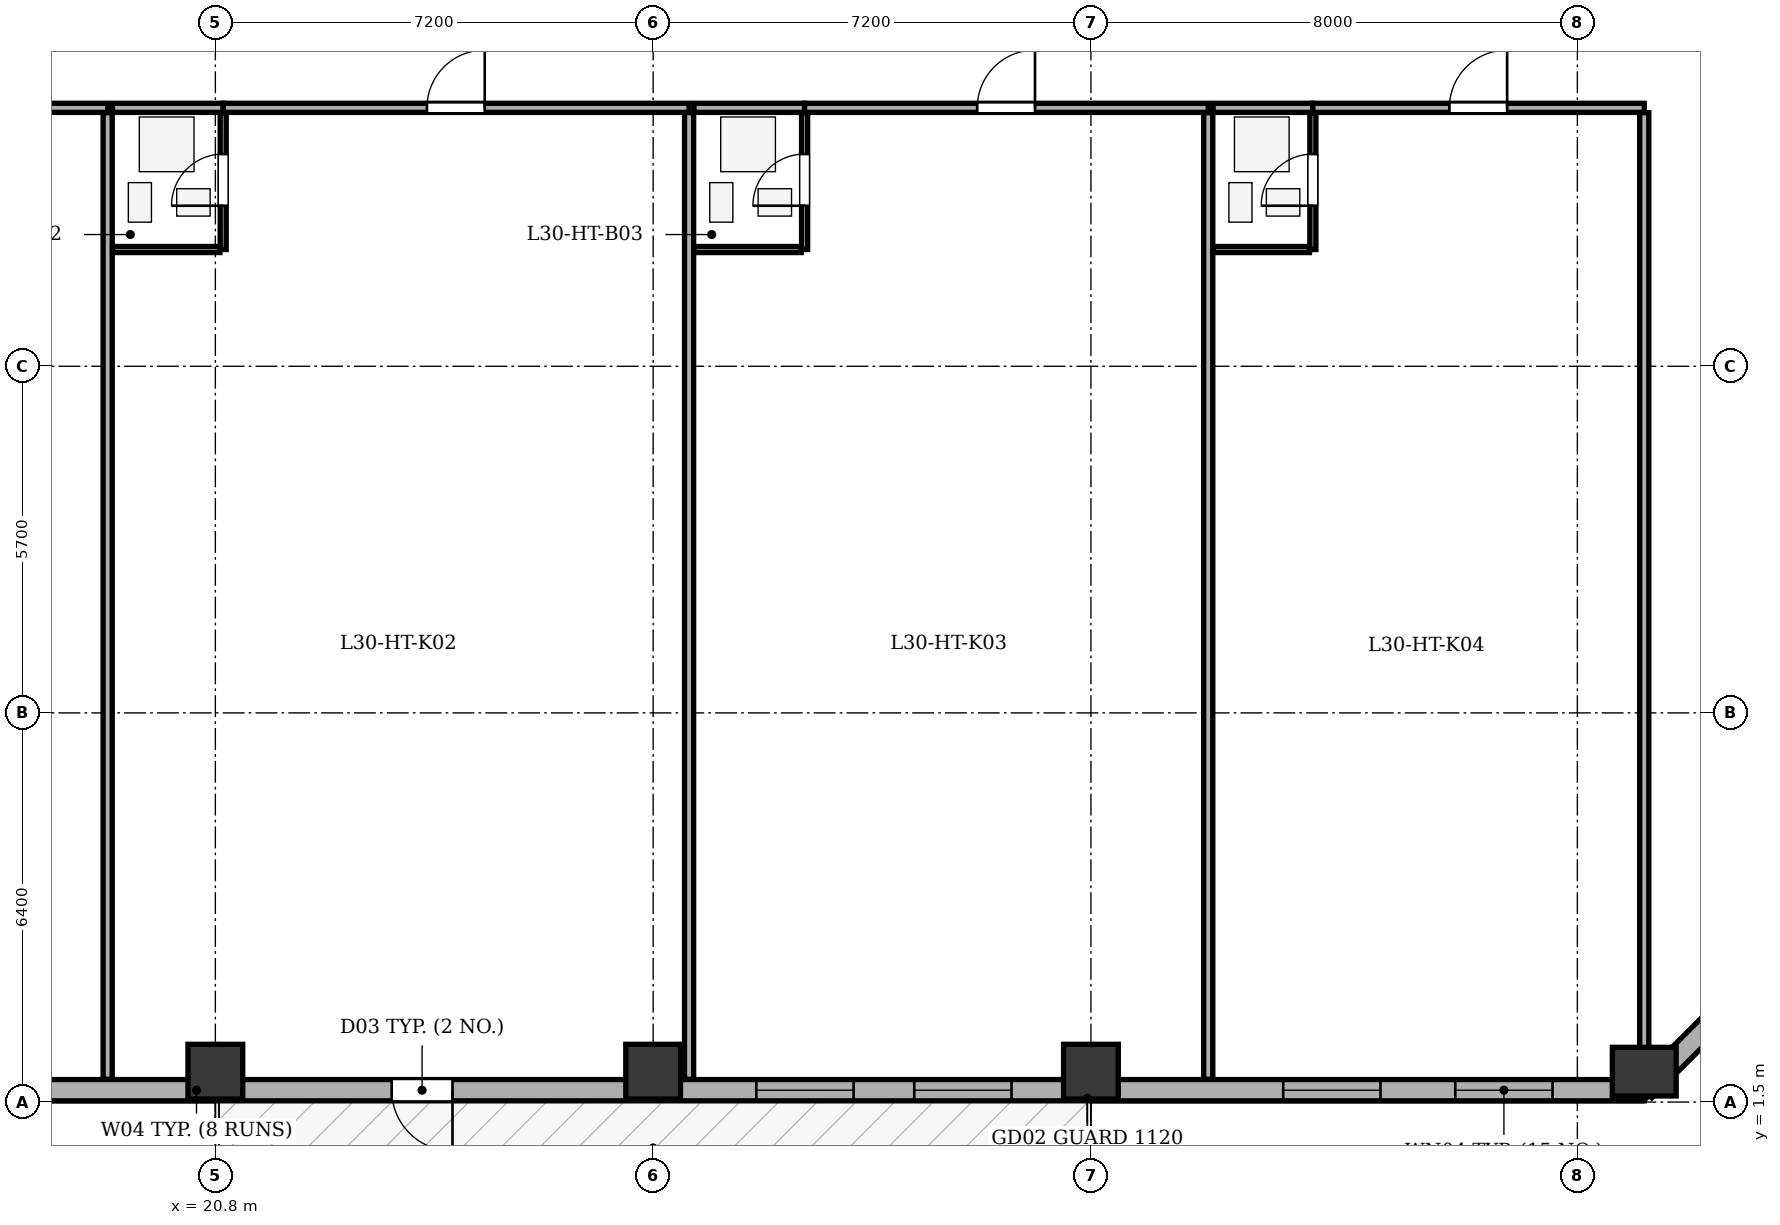
"""IFC4 building model, lengths in metres.
Left out: names, types, materials, properties, quantities, classifications, styles, units other than length and angle.
Written with IfcOpenShell. Run it as: python <this file> out.ifc"""

import sys

from ifc_helpers import new_model, si_unit, direction, frame, frame_2d, origin, origin_2d, place, context, subcontext, project, spatial, rectangle, extrude, element, fill, save


model = new_model("IFC4")
c1 = context("Model", 3, precision=1e-05, world=origin(), true_north=direction((0.0, 1.0)))
c2 = subcontext(c1, "Body", "Model", "MODEL_VIEW")
j1 = project(units=[si_unit("LENGTHUNIT", "METRE"), si_unit("PLANEANGLEUNIT", "RADIAN")], contexts=[c1])
p1 = place(None, origin())
s1 = spatial("IfcSite", under=j1, at=p1, CompositionType="ELEMENT")
p2 = place(p1, origin())
s2 = spatial("IfcBuilding", under=s1, at=p2, CompositionType="ELEMENT")
p3 = place(p2, frame((0.0, 0.0, 123.8)))
s3 = spatial("IfcBuildingStorey", under=s2, at=p3, CompositionType="ELEMENT", Elevation=123.8)
for number, where, z_axis, x_axis in (
    (1, (20.8, 2.0, 0.0), (0.0, 0.0, 1.0), (1.0, 0.0, 0.0)),
    (2, (28.0, 2.0, 0.0), (0.0, 0.0, 1.0), (1.0, 0.0, 0.0)),
    (3, (35.2, 2.0, 0.0), (0.0, 0.0, 1.0), (1.0, 0.0, 0.0)),
):
    element("IfcColumn", number, at=place(p3, frame(where, z_axis=z_axis, x_axis=x_axis)), inside=s3, PredefinedType="COLUMN", context=c2, shape_type="SweptSolid", body=[
        extrude(rectangle(XDim=0.9, YDim=0.9, at=origin_2d()), origin(), (0.0, 0.0, 1.0), 3.5),
    ])
p4 = place(p3, frame((44.3, 2.0, 0.0), z_axis=(0.0, 0.0, 1.0), x_axis=(1.0, 0.0, 0.0)))
e4 = element("IfcColumn", 4, at=p4, inside=s3, PredefinedType="COLUMN", context=c2, shape_type="SweptSolid", body=[
    extrude(rectangle(XDim=0.8, YDim=1.05, at=origin_2d()), origin(), (0.0, 0.0, 1.0), 3.5),
])
p5 = place(p3, frame((44.3, 1.695, 0.0), z_axis=(0.0, 0.0, 1.0), x_axis=(-1.0, 0.0, 0.0)))
e5 = element("IfcWall", 5, at=p5, inside=s3, PredefinedType="STANDARD", context=c2, shape_type="SweptSolid", body=[
    extrude(rectangle(XDim=35.0, YDim=0.35, at=frame_2d((17.5, 0.0))), origin(), (0.0, 0.0, 1.0), 2.785),
])
p6 = place(p5, frame((19.6, 0.0, 0.0)))
e6 = element("IfcOpeningElement", 6, at=p6, cuts=e5, PredefinedType="OPENING", context=c2, shape_type="SweptSolid", body=[
    extrude(rectangle(XDim=1.0, YDim=2.02, at=frame_2d((0.5, 1.01))), frame((0.0, 0.185, 0.0), z_axis=(0.0, -1.0, 0.0), x_axis=(1.0, 0.0, 0.0)), (0.0, 0.0, 1.0), 0.37),
])
p7 = place(p5, frame((1.508, 0.0, 0.75)))
e7 = element("IfcOpeningElement", 7, at=p7, cuts=e5, PredefinedType="OPENING", context=c2, shape_type="SweptSolid", body=[
    extrude(rectangle(XDim=1.6, YDim=1.75, at=frame_2d((0.8, 0.875))), frame((0.0, 0.185, 0.0), z_axis=(0.0, -1.0, 0.0), x_axis=(1.0, 0.0, 0.0)), (0.0, 0.0, 1.0), 0.37),
])
p8 = place(p5, frame((4.338, 0.0, 0.75)))
e8 = element("IfcOpeningElement", 8, at=p8, cuts=e5, PredefinedType="OPENING", context=c2, shape_type="SweptSolid", body=[
    extrude(rectangle(XDim=1.6, YDim=1.75, at=frame_2d((0.8, 0.875))), frame((0.0, 0.185, 0.0), z_axis=(0.0, -1.0, 0.0), x_axis=(1.0, 0.0, 0.0)), (0.0, 0.0, 1.0), 0.37),
])
p9 = place(p5, frame((10.406, 0.0, 0.75)))
e9 = element("IfcOpeningElement", 9, at=p9, cuts=e5, PredefinedType="OPENING", context=c2, shape_type="SweptSolid", body=[
    extrude(rectangle(XDim=1.6, YDim=1.75, at=frame_2d((0.8, 0.875))), frame((0.0, 0.185, 0.0), z_axis=(0.0, -1.0, 0.0), x_axis=(1.0, 0.0, 0.0)), (0.0, 0.0, 1.0), 0.37),
])
p10 = place(p5, frame((13.003, 0.0, 0.75)))
e10 = element("IfcOpeningElement", 10, at=p10, cuts=e5, PredefinedType="OPENING", context=c2, shape_type="SweptSolid", body=[
    extrude(rectangle(XDim=1.6, YDim=1.75, at=frame_2d((0.8, 0.875))), frame((0.0, 0.185, 0.0), z_axis=(0.0, -1.0, 0.0), x_axis=(1.0, 0.0, 0.0)), (0.0, 0.0, 1.0), 0.37),
])
p11 = place(p5, frame((27.02, 0.0, 0.75)))
e11 = element("IfcOpeningElement", 11, at=p11, cuts=e5, PredefinedType="OPENING", context=c2, shape_type="SweptSolid", body=[
    extrude(rectangle(XDim=1.6, YDim=1.75, at=frame_2d((0.8, 0.875))), frame((0.0, 0.185, 0.0), z_axis=(0.0, -1.0, 0.0), x_axis=(1.0, 0.0, 0.0)), (0.0, 0.0, 1.0), 0.37),
])
p12 = place(p5, frame((30.551, 0.0, 0.75)))
e12 = element("IfcOpeningElement", 12, at=p12, cuts=e5, PredefinedType="OPENING", context=c2, shape_type="SweptSolid", body=[
    extrude(rectangle(XDim=2.1, YDim=1.75, at=frame_2d((1.05, 0.875))), frame((0.0, 0.185, 0.0), z_axis=(0.0, -1.0, 0.0), x_axis=(1.0, 0.0, 0.0)), (0.0, 0.0, 1.0), 0.37),
])
p13 = place(p3, frame((49.105, 6.5, 0.0), z_axis=(0.0, 0.0, 1.0), x_axis=(-0.707106781187, -0.707106781187, 0.0)))
e13 = element("IfcWall", 13, at=p13, inside=s3, PredefinedType="STANDARD", context=c2, shape_type="SweptSolid", body=[
    extrude(rectangle(XDim=6.795, YDim=0.35, at=frame_2d((3.397, 0.0))), origin(), (0.0, 0.0, 1.0), 2.785),
])
p14 = place(p13, frame((2.698, 0.0, 0.75)))
e14 = element("IfcOpeningElement", 14, at=p14, cuts=e13, PredefinedType="OPENING", context=c2, shape_type="SweptSolid", body=[
    extrude(rectangle(XDim=1.4, YDim=1.65, at=frame_2d((0.7, 0.825))), frame((0.0, 0.185, 0.0), z_axis=(0.0, -1.0, 0.0), x_axis=(1.0, 0.0, 0.0)), (0.0, 0.0, 1.0), 0.37),
])
p15 = place(p3, frame((12.05, 17.85, 0.0), z_axis=(0.0, 0.0, 1.0), x_axis=(1.0, 0.0, 0.0)))
e15 = element("IfcWall", 15, at=p15, inside=s3, PredefinedType="PARTITIONING", context=c2, shape_type="SweptSolid", body=[
    extrude(rectangle(XDim=6.979, YDim=0.15, at=frame_2d((3.49, 0.0))), origin(), (0.0, 0.0, 1.0), 3.2),
])
p16 = place(p15, frame((3.01, 0.0, 0.0)))
e16 = element("IfcOpeningElement", 16, at=p16, cuts=e15, PredefinedType="OPENING", context=c2, shape_type="SweptSolid", body=[
    extrude(rectangle(XDim=0.95, YDim=2.1, at=frame_2d((0.475, 1.05))), frame((0.0, 0.085, 0.0), z_axis=(0.0, -1.0, 0.0), x_axis=(1.0, 0.0, 0.0)), (0.0, 0.0, 1.0), 0.17),
])
p17 = place(p3, frame((19.029, 1.875, 0.0), z_axis=(0.0, 0.0, 1.0), x_axis=(0.0, 1.0, 0.0)))
e17 = element("IfcWall", 17, at=p17, inside=s3, PredefinedType="PARTITIONING", context=c2, shape_type="SweptSolid", body=[
    extrude(rectangle(XDim=15.895, YDim=0.15, at=frame_2d((7.948, 0.0))), origin(), (0.0, 0.0, 1.0), 3.2),
])
p18 = place(p3, frame((19.109, 17.85, 0.0), z_axis=(0.0, 0.0, 1.0), x_axis=(1.0, 0.0, 0.0)))
e18 = element("IfcWall", 18, at=p18, inside=s3, PredefinedType="PARTITIONING", context=c2, shape_type="SweptSolid", body=[
    extrude(rectangle(XDim=1.82, YDim=0.15, at=frame_2d((0.91, 0.0))), origin(), (0.0, 0.0, 1.0), 3.2),
])
p19 = place(p3, frame((20.929, 17.85, 0.0), z_axis=(0.0, 0.0, 1.0), x_axis=(1.0, 0.0, 0.0)))
e19 = element("IfcWall", 19, at=p19, inside=s3, PredefinedType="PARTITIONING", context=c2, shape_type="SweptSolid", body=[
    extrude(rectangle(XDim=7.662, YDim=0.15, at=frame_2d((3.831, 0.0))), origin(), (0.0, 0.0, 1.0), 3.2),
])
p20 = place(p19, frame((3.351, 0.0, 0.0)))
e20 = element("IfcOpeningElement", 20, at=p20, cuts=e19, PredefinedType="OPENING", context=c2, shape_type="SweptSolid", body=[
    extrude(rectangle(XDim=0.95, YDim=2.1, at=frame_2d((0.475, 1.05))), frame((0.0, 0.085, 0.0), z_axis=(0.0, -1.0, 0.0), x_axis=(1.0, 0.0, 0.0)), (0.0, 0.0, 1.0), 0.17),
])
p21 = place(p3, frame((20.929, 15.52, 0.0), z_axis=(0.0, 0.0, 1.0), x_axis=(0.0, 1.0, 0.0)))
e21 = element("IfcWall", 21, at=p21, inside=s3, PredefinedType="PARTITIONING", context=c2, shape_type="SweptSolid", body=[
    extrude(rectangle(XDim=2.25, YDim=0.1, at=frame_2d((1.125, 0.0))), origin(), (0.0, 0.0, 1.0), 2.535),
])
p22 = place(p21, frame((0.72, 0.0, 0.0)))
e22 = element("IfcOpeningElement", 22, at=p22, cuts=e21, PredefinedType="OPENING", context=c2, shape_type="SweptSolid", body=[
    extrude(rectangle(XDim=0.85, YDim=2.05, at=frame_2d((0.425, 1.025))), frame((0.0, 0.06, 0.0), z_axis=(0.0, -1.0, 0.0), x_axis=(1.0, 0.0, 0.0)), (0.0, 0.0, 1.0), 0.12),
])
p23 = place(p3, frame((19.109, 15.52, 0.0), z_axis=(0.0, 0.0, 1.0), x_axis=(1.0, 0.0, 0.0)))
e23 = element("IfcWall", 23, at=p23, inside=s3, PredefinedType="PARTITIONING", context=c2, shape_type="SweptSolid", body=[
    extrude(rectangle(XDim=1.765, YDim=0.1, at=frame_2d((0.883, 0.0))), origin(), (0.0, 0.0, 1.0), 3.2),
])
p24 = place(p3, frame((28.591, 1.875, 0.0), z_axis=(0.0, 0.0, 1.0), x_axis=(0.0, 1.0, 0.0)))
e24 = element("IfcWall", 24, at=p24, inside=s3, PredefinedType="PARTITIONING", context=c2, shape_type="SweptSolid", body=[
    extrude(rectangle(XDim=15.895, YDim=0.15, at=frame_2d((7.948, 0.0))), origin(), (0.0, 0.0, 1.0), 3.2),
])
p25 = place(p3, frame((28.671, 17.85, 0.0), z_axis=(0.0, 0.0, 1.0), x_axis=(1.0, 0.0, 0.0)))
e25 = element("IfcWall", 25, at=p25, inside=s3, PredefinedType="PARTITIONING", context=c2, shape_type="SweptSolid", body=[
    extrude(rectangle(XDim=1.82, YDim=0.15, at=frame_2d((0.91, 0.0))), origin(), (0.0, 0.0, 1.0), 3.2),
])
p26 = place(p3, frame((30.491, 17.85, 0.0), z_axis=(0.0, 0.0, 1.0), x_axis=(1.0, 0.0, 0.0)))
e26 = element("IfcWall", 26, at=p26, inside=s3, PredefinedType="PARTITIONING", context=c2, shape_type="SweptSolid", body=[
    extrude(rectangle(XDim=6.638, YDim=0.15, at=frame_2d((3.319, 0.0))), origin(), (0.0, 0.0, 1.0), 3.2),
])
p27 = place(p26, frame((2.839, 0.0, 0.0)))
e27 = element("IfcOpeningElement", 27, at=p27, cuts=e26, PredefinedType="OPENING", context=c2, shape_type="SweptSolid", body=[
    extrude(rectangle(XDim=0.95, YDim=2.1, at=frame_2d((0.475, 1.05))), frame((0.0, 0.085, 0.0), z_axis=(0.0, -1.0, 0.0), x_axis=(1.0, 0.0, 0.0)), (0.0, 0.0, 1.0), 0.17),
])
p28 = place(p3, frame((30.491, 15.52, 0.0), z_axis=(0.0, 0.0, 1.0), x_axis=(0.0, 1.0, 0.0)))
e28 = element("IfcWall", 28, at=p28, inside=s3, PredefinedType="PARTITIONING", context=c2, shape_type="SweptSolid", body=[
    extrude(rectangle(XDim=2.25, YDim=0.1, at=frame_2d((1.125, 0.0))), origin(), (0.0, 0.0, 1.0), 3.2),
])
p29 = place(p28, frame((0.72, 0.0, 0.0)))
e29 = element("IfcOpeningElement", 29, at=p29, cuts=e28, PredefinedType="OPENING", context=c2, shape_type="SweptSolid", body=[
    extrude(rectangle(XDim=0.85, YDim=2.05, at=frame_2d((0.425, 1.025))), frame((0.0, 0.06, 0.0), z_axis=(0.0, -1.0, 0.0), x_axis=(1.0, 0.0, 0.0)), (0.0, 0.0, 1.0), 0.12),
])
p30 = place(p3, frame((28.671, 15.52, 0.0), z_axis=(0.0, 0.0, 1.0), x_axis=(1.0, 0.0, 0.0)))
e30 = element("IfcWall", 30, at=p30, inside=s3, PredefinedType="PARTITIONING", context=c2, shape_type="SweptSolid", body=[
    extrude(rectangle(XDim=1.765, YDim=0.1, at=frame_2d((0.883, 0.0))), origin(), (0.0, 0.0, 1.0), 3.2),
])
p31 = place(p3, frame((37.129, 1.875, 0.0), z_axis=(0.0, 0.0, 1.0), x_axis=(0.0, 1.0, 0.0)))
e31 = element("IfcWall", 31, at=p31, inside=s3, PredefinedType="PARTITIONING", context=c2, shape_type="SweptSolid", body=[
    extrude(rectangle(XDim=15.895, YDim=0.15, at=frame_2d((7.948, 0.0))), origin(), (0.0, 0.0, 1.0), 3.2),
])
p32 = place(p3, frame((37.209, 17.85, 0.0), z_axis=(0.0, 0.0, 1.0), x_axis=(1.0, 0.0, 0.0)))
e32 = element("IfcWall", 32, at=p32, inside=s3, PredefinedType="PARTITIONING", context=c2, shape_type="SweptSolid", body=[
    extrude(rectangle(XDim=1.641, YDim=0.15, at=frame_2d((0.821, 0.0))), origin(), (0.0, 0.0, 1.0), 3.2),
])
p33 = place(p3, frame((38.85, 17.85, 0.0), z_axis=(0.0, 0.0, 1.0), x_axis=(1.0, 0.0, 0.0)))
e33 = element("IfcWall", 33, at=p33, inside=s3, PredefinedType="PARTITIONING", context=c2, shape_type="SweptSolid", body=[
    extrude(rectangle(XDim=5.45, YDim=0.15, at=frame_2d((2.725, 0.0))), origin(), (0.0, 0.0, 1.0), 3.2),
])
p34 = place(p33, frame((2.245, 0.0, 0.0)))
e34 = element("IfcOpeningElement", 34, at=p34, cuts=e33, PredefinedType="OPENING", context=c2, shape_type="SweptSolid", body=[
    extrude(rectangle(XDim=0.95, YDim=2.1, at=frame_2d((0.475, 1.05))), frame((0.0, 0.085, 0.0), z_axis=(0.0, -1.0, 0.0), x_axis=(1.0, 0.0, 0.0)), (0.0, 0.0, 1.0), 0.17),
])
p35 = place(p3, frame((38.85, 15.52, 0.0), z_axis=(0.0, 0.0, 1.0), x_axis=(0.0, 1.0, 0.0)))
e35 = element("IfcWall", 35, at=p35, inside=s3, PredefinedType="PARTITIONING", context=c2, shape_type="SweptSolid", body=[
    extrude(rectangle(XDim=2.25, YDim=0.1, at=frame_2d((1.125, 0.0))), origin(), (0.0, 0.0, 1.0), 3.2),
])
p36 = place(p35, frame((0.72, 0.0, 0.0)))
e36 = element("IfcOpeningElement", 36, at=p36, cuts=e35, PredefinedType="OPENING", context=c2, shape_type="SweptSolid", body=[
    extrude(rectangle(XDim=0.85, YDim=2.05, at=frame_2d((0.425, 1.025))), frame((0.0, 0.06, 0.0), z_axis=(0.0, -1.0, 0.0), x_axis=(1.0, 0.0, 0.0)), (0.0, 0.0, 1.0), 0.12),
])
p37 = place(p3, frame((37.209, 15.52, 0.0), z_axis=(0.0, 0.0, 1.0), x_axis=(1.0, 0.0, 0.0)))
e37 = element("IfcWall", 37, at=p37, inside=s3, PredefinedType="PARTITIONING", context=c2, shape_type="SweptSolid", body=[
    extrude(rectangle(XDim=1.586, YDim=0.1, at=frame_2d((0.793, 0.0))), origin(), (0.0, 0.0, 1.0), 3.2),
])
p38 = place(p3, frame((44.3, 1.875, 0.0), z_axis=(0.0, 0.0, 1.0), x_axis=(0.0, 1.0, 0.0)))
e38 = element("IfcWall", 38, at=p38, inside=s3, PredefinedType="PARTITIONING", context=c2, shape_type="SweptSolid", body=[
    extrude(rectangle(XDim=15.895, YDim=0.15, at=frame_2d((7.948, 0.0))), origin(), (0.0, 0.0, 1.0), 3.2),
])
p39 = place(p6, origin())
e39 = element("IfcDoor", 39, at=p39, inside=s3, OperationType="SINGLE_SWING_LEFT", PredefinedType="DOOR", context=c2, shape_type="SweptSolid", body=[
    extrude(rectangle(XDim=1.0, YDim=2.02, at=frame_2d((0.5, 1.01))), frame((0.0, 0.025, 0.0), z_axis=(0.0, -1.0, 0.0), x_axis=(1.0, 0.0, 0.0)), (0.0, 0.0, 1.0), 0.05),
])
fill(e6, e39)
p40 = place(p7, origin())
e40 = element("IfcWindow", 40, at=p40, inside=s3, PartitioningType="SINGLE_PANEL", PredefinedType="WINDOW", context=c2, shape_type="SweptSolid", body=[
    extrude(rectangle(XDim=1.6, YDim=1.75, at=frame_2d((0.8, 0.875))), frame((0.0, -0.01, 0.0), z_axis=(0.0, -1.0, 0.0), x_axis=(1.0, 0.0, 0.0)), (0.0, 0.0, 1.0), 0.06),
])
fill(e7, e40)
p41 = place(p8, origin())
e41 = element("IfcWindow", 41, at=p41, inside=s3, PartitioningType="SINGLE_PANEL", PredefinedType="WINDOW", context=c2, shape_type="SweptSolid", body=[
    extrude(rectangle(XDim=1.6, YDim=1.75, at=frame_2d((0.8, 0.875))), frame((0.0, -0.01, 0.0), z_axis=(0.0, -1.0, 0.0), x_axis=(1.0, 0.0, 0.0)), (0.0, 0.0, 1.0), 0.06),
])
fill(e8, e41)
p42 = place(p9, origin())
e42 = element("IfcWindow", 42, at=p42, inside=s3, PartitioningType="SINGLE_PANEL", PredefinedType="WINDOW", context=c2, shape_type="SweptSolid", body=[
    extrude(rectangle(XDim=1.6, YDim=1.75, at=frame_2d((0.8, 0.875))), frame((0.0, -0.01, 0.0), z_axis=(0.0, -1.0, 0.0), x_axis=(1.0, 0.0, 0.0)), (0.0, 0.0, 1.0), 0.06),
])
fill(e9, e42)
p43 = place(p10, origin())
e43 = element("IfcWindow", 43, at=p43, inside=s3, PartitioningType="SINGLE_PANEL", PredefinedType="WINDOW", context=c2, shape_type="SweptSolid", body=[
    extrude(rectangle(XDim=1.6, YDim=1.75, at=frame_2d((0.8, 0.875))), frame((0.0, -0.01, 0.0), z_axis=(0.0, -1.0, 0.0), x_axis=(1.0, 0.0, 0.0)), (0.0, 0.0, 1.0), 0.06),
])
fill(e10, e43)
p44 = place(p22, origin())
e44 = element("IfcDoor", 44, at=p44, inside=s3, OperationType="SINGLE_SWING_LEFT", PredefinedType="DOOR", context=c2, shape_type="SweptSolid", body=[
    extrude(rectangle(XDim=0.85, YDim=2.05, at=frame_2d((0.425, 1.025))), frame((0.0, 0.025, 0.0), z_axis=(0.0, -1.0, 0.0), x_axis=(1.0, 0.0, 0.0)), (0.0, 0.0, 1.0), 0.05),
])
fill(e22, e44)
p45 = place(p20, origin())
e45 = element("IfcDoor", 45, at=p45, inside=s3, OperationType="SINGLE_SWING_RIGHT", PredefinedType="DOOR", context=c2, shape_type="SweptSolid", body=[
    extrude(rectangle(XDim=0.95, YDim=2.1, at=frame_2d((0.475, 1.05))), frame((0.0, 0.025, 0.0), z_axis=(0.0, -1.0, 0.0), x_axis=(1.0, 0.0, 0.0)), (0.0, 0.0, 1.0), 0.05),
])
fill(e20, e45)
p46 = place(p29, origin())
e46 = element("IfcDoor", 46, at=p46, inside=s3, OperationType="SINGLE_SWING_LEFT", PredefinedType="DOOR", context=c2, shape_type="SweptSolid", body=[
    extrude(rectangle(XDim=0.85, YDim=2.05, at=frame_2d((0.425, 1.025))), frame((0.0, 0.025, 0.0), z_axis=(0.0, -1.0, 0.0), x_axis=(1.0, 0.0, 0.0)), (0.0, 0.0, 1.0), 0.05),
])
fill(e29, e46)
p47 = place(p27, origin())
e47 = element("IfcDoor", 47, at=p47, inside=s3, OperationType="SINGLE_SWING_RIGHT", PredefinedType="DOOR", context=c2, shape_type="SweptSolid", body=[
    extrude(rectangle(XDim=0.95, YDim=2.1, at=frame_2d((0.475, 1.05))), frame((0.0, 0.025, 0.0), z_axis=(0.0, -1.0, 0.0), x_axis=(1.0, 0.0, 0.0)), (0.0, 0.0, 1.0), 0.05),
])
fill(e27, e47)
p48 = place(p36, origin())
e48 = element("IfcDoor", 48, at=p48, inside=s3, OperationType="SINGLE_SWING_LEFT", PredefinedType="DOOR", context=c2, shape_type="SweptSolid", body=[
    extrude(rectangle(XDim=0.85, YDim=2.05, at=frame_2d((0.425, 1.025))), frame((0.0, 0.025, 0.0), z_axis=(0.0, -1.0, 0.0), x_axis=(1.0, 0.0, 0.0)), (0.0, 0.0, 1.0), 0.05),
])
fill(e36, e48)
p49 = place(p34, origin())
e49 = element("IfcDoor", 49, at=p49, inside=s3, OperationType="SINGLE_SWING_RIGHT", PredefinedType="DOOR", context=c2, shape_type="SweptSolid", body=[
    extrude(rectangle(XDim=0.95, YDim=2.1, at=frame_2d((0.475, 1.05))), frame((0.0, 0.025, 0.0), z_axis=(0.0, -1.0, 0.0), x_axis=(1.0, 0.0, 0.0)), (0.0, 0.0, 1.0), 0.05),
])
fill(e34, e49)
save(model, sys.argv[1])
